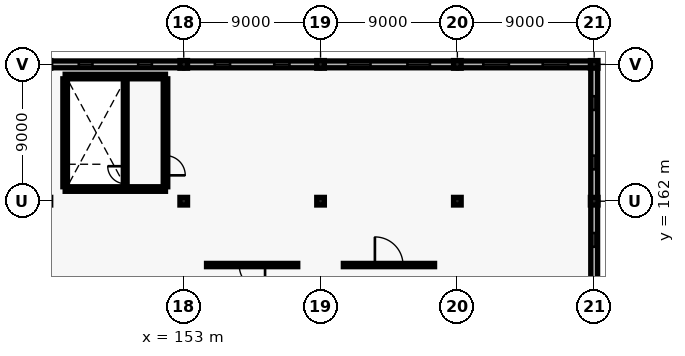
"""IFC4 building model, lengths in metres.
Left out: names, types, materials, properties, quantities, classifications, styles, units other than length and angle.
Written with IfcOpenShell. Run it as: python <this file> out.ifc"""

import sys

from ifc_helpers import new_model, si_unit, direction, frame, frame_2d, origin, origin_2d, place, context, subcontext, project, spatial, rectangle, extrude, element, fill, save


model = new_model("IFC4")
c1 = context("Model", 3, precision=1e-05, world=origin(), true_north=direction((0.0, 1.0)))
c2 = subcontext(c1, "Body", "Model", "MODEL_VIEW")
j1 = project(units=[si_unit("LENGTHUNIT", "METRE"), si_unit("PLANEANGLEUNIT", "RADIAN")], contexts=[c1])
p1 = place(None, origin())
s1 = spatial("IfcSite", under=j1, at=p1, CompositionType="ELEMENT")
p2 = place(p1, origin())
s2 = spatial("IfcBuilding", under=s1, at=p2, CompositionType="ELEMENT")
p3 = place(p2, frame((0.0, 0.0, 9.6)))
s3 = spatial("IfcBuildingStorey", under=s2, at=p3, CompositionType="ELEMENT", Elevation=9.6)
for number, where, z_axis, x_axis in (
    (1, (153.0, 162.0, 0.0), (0.0, 0.0, 1.0), (1.0, 0.0, 0.0)),
    (2, (153.0, 171.0, 0.0), (0.0, 0.0, 1.0), (1.0, 0.0, 0.0)),
    (3, (162.0, 162.0, 0.0), (0.0, 0.0, 1.0), (1.0, 0.0, 0.0)),
    (4, (162.0, 171.0, 0.0), (0.0, 0.0, 1.0), (1.0, 0.0, 0.0)),
    (5, (171.0, 162.0, 0.0), (0.0, 0.0, 1.0), (1.0, 0.0, 0.0)),
    (6, (171.0, 171.0, 0.0), (0.0, 0.0, 1.0), (1.0, 0.0, 0.0)),
    (7, (180.0, 162.0, 0.0), (0.0, 0.0, 1.0), (1.0, 0.0, 0.0)),
    (8, (180.0, 171.0, 0.0), (0.0, 0.0, 1.0), (1.0, 0.0, 0.0)),
):
    element("IfcColumn", number, at=place(p3, frame(where, z_axis=z_axis, x_axis=x_axis)), inside=s3, PredefinedType="COLUMN", context=c2, shape_type="SweptSolid", body=[
        extrude(rectangle(XDim=0.5, YDim=0.5, at=origin_2d()), origin(), (0.0, 0.0, 1.0), 3.9),
    ])
p4 = place(p3, frame((144.06, 171.0, 0.0), z_axis=(0.0, 0.0, 1.0), x_axis=(1.0, 0.0, 0.0)))
e9 = element("IfcWall", 9, at=p4, inside=s3, PredefinedType="SOLIDWALL", context=c2, shape_type="SweptSolid", body=[
    extrude(rectangle(XDim=8.88, YDim=0.45, at=frame_2d((4.44, 0.0))), origin(), (0.0, 0.0, 1.0), 3.15),
])
p5 = place(p4, frame((2.036, 0.0, 0.9)))
e10 = element("IfcOpeningElement", 10, at=p5, cuts=e9, PredefinedType="OPENING", context=c2, shape_type="SweptSolid", body=[
    extrude(rectangle(XDim=0.9, YDim=1.2, at=frame_2d((0.45, 0.6))), frame((0.0, 0.235, 0.0), z_axis=(0.0, -1.0, 0.0), x_axis=(1.0, 0.0, 0.0)), (0.0, 0.0, 1.0), 0.47),
])
p6 = place(p4, frame((5.944, 0.0, 0.9)))
e11 = element("IfcOpeningElement", 11, at=p6, cuts=e9, PredefinedType="OPENING", context=c2, shape_type="SweptSolid", body=[
    extrude(rectangle(XDim=0.9, YDim=1.2, at=frame_2d((0.45, 0.6))), frame((0.0, 0.235, 0.0), z_axis=(0.0, -1.0, 0.0), x_axis=(1.0, 0.0, 0.0)), (0.0, 0.0, 1.0), 0.47),
])
p7 = place(p3, frame((153.06, 171.0, 0.0), z_axis=(0.0, 0.0, 1.0), x_axis=(1.0, 0.0, 0.0)))
e12 = element("IfcWall", 12, at=p7, inside=s3, PredefinedType="SOLIDWALL", context=c2, shape_type="SweptSolid", body=[
    extrude(rectangle(XDim=8.88, YDim=0.45, at=frame_2d((4.44, 0.0))), origin(), (0.0, 0.0, 1.0), 3.15),
])
p8 = place(p7, frame((1.986, 0.0, 0.9)))
e13 = element("IfcOpeningElement", 13, at=p8, cuts=e12, PredefinedType="OPENING", context=c2, shape_type="SweptSolid", body=[
    extrude(rectangle(XDim=1.0, YDim=1.5, at=frame_2d((0.5, 0.75))), frame((0.0, 0.235, 0.0), z_axis=(0.0, -1.0, 0.0), x_axis=(1.0, 0.0, 0.0)), (0.0, 0.0, 1.0), 0.47),
])
p9 = place(p7, frame((5.894, 0.0, 0.9)))
e14 = element("IfcOpeningElement", 14, at=p9, cuts=e12, PredefinedType="OPENING", context=c2, shape_type="SweptSolid", body=[
    extrude(rectangle(XDim=1.0, YDim=1.5, at=frame_2d((0.5, 0.75))), frame((0.0, 0.235, 0.0), z_axis=(0.0, -1.0, 0.0), x_axis=(1.0, 0.0, 0.0)), (0.0, 0.0, 1.0), 0.47),
])
p10 = place(p3, frame((162.06, 171.0, 0.0), z_axis=(0.0, 0.0, 1.0), x_axis=(1.0, 0.0, 0.0)))
e15 = element("IfcWall", 15, at=p10, inside=s3, PredefinedType="SOLIDWALL", context=c2, shape_type="SweptSolid", body=[
    extrude(rectangle(XDim=8.88, YDim=0.45, at=frame_2d((4.44, 0.0))), origin(), (0.0, 0.0, 1.0), 3.15),
])
p11 = place(p10, frame((1.746, 0.0, 0.9)))
e16 = element("IfcOpeningElement", 16, at=p11, cuts=e15, PredefinedType="OPENING", context=c2, shape_type="SweptSolid", body=[
    extrude(rectangle(XDim=1.48, YDim=1.75, at=frame_2d((0.74, 0.875))), frame((0.0, 0.235, 0.0), z_axis=(0.0, -1.0, 0.0), x_axis=(1.0, 0.0, 0.0)), (0.0, 0.0, 1.0), 0.47),
])
p12 = place(p10, frame((5.654, 0.0, 0.9)))
e17 = element("IfcOpeningElement", 17, at=p12, cuts=e15, PredefinedType="OPENING", context=c2, shape_type="SweptSolid", body=[
    extrude(rectangle(XDim=1.48, YDim=1.75, at=frame_2d((0.74, 0.875))), frame((0.0, 0.235, 0.0), z_axis=(0.0, -1.0, 0.0), x_axis=(1.0, 0.0, 0.0)), (0.0, 0.0, 1.0), 0.47),
])
p13 = place(p3, frame((171.06, 171.0, 0.0), z_axis=(0.0, 0.0, 1.0), x_axis=(1.0, 0.0, 0.0)))
e18 = element("IfcWall", 18, at=p13, inside=s3, PredefinedType="SOLIDWALL", context=c2, shape_type="SweptSolid", body=[
    extrude(rectangle(XDim=8.88, YDim=0.45, at=frame_2d((4.44, 0.0))), origin(), (0.0, 0.0, 1.0), 3.15),
])
p14 = place(p13, frame((1.646, 0.0, 0.9)))
e19 = element("IfcOpeningElement", 19, at=p14, cuts=e18, PredefinedType="OPENING", context=c2, shape_type="SweptSolid", body=[
    extrude(rectangle(XDim=1.68, YDim=1.85, at=frame_2d((0.84, 0.925))), frame((0.0, 0.235, 0.0), z_axis=(0.0, -1.0, 0.0), x_axis=(1.0, 0.0, 0.0)), (0.0, 0.0, 1.0), 0.47),
])
p15 = place(p13, frame((5.554, 0.0, 0.9)))
e20 = element("IfcOpeningElement", 20, at=p15, cuts=e18, PredefinedType="OPENING", context=c2, shape_type="SweptSolid", body=[
    extrude(rectangle(XDim=1.68, YDim=1.85, at=frame_2d((0.84, 0.925))), frame((0.0, 0.235, 0.0), z_axis=(0.0, -1.0, 0.0), x_axis=(1.0, 0.0, 0.0)), (0.0, 0.0, 1.0), 0.47),
])
p16 = place(p3, frame((180.0, 153.06, 0.0), z_axis=(0.0, 0.0, 1.0), x_axis=(0.0, 1.0, 0.0)))
e21 = element("IfcWall", 21, at=p16, inside=s3, PredefinedType="SOLIDWALL", context=c2, shape_type="SweptSolid", body=[
    extrude(rectangle(XDim=8.88, YDim=0.45, at=frame_2d((4.44, 0.0))), origin(), (0.0, 0.0, 1.0), 3.15),
])
p17 = place(p16, frame((2.036, 0.0, 0.9)))
e22 = element("IfcOpeningElement", 22, at=p17, cuts=e21, PredefinedType="OPENING", context=c2, shape_type="SweptSolid", body=[
    extrude(rectangle(XDim=0.9, YDim=1.2, at=frame_2d((0.45, 0.6))), frame((0.0, 0.235, 0.0), z_axis=(0.0, -1.0, 0.0), x_axis=(1.0, 0.0, 0.0)), (0.0, 0.0, 1.0), 0.47),
])
p18 = place(p16, frame((5.944, 0.0, 0.9)))
e23 = element("IfcOpeningElement", 23, at=p18, cuts=e21, PredefinedType="OPENING", context=c2, shape_type="SweptSolid", body=[
    extrude(rectangle(XDim=0.9, YDim=1.2, at=frame_2d((0.45, 0.6))), frame((0.0, 0.235, 0.0), z_axis=(0.0, -1.0, 0.0), x_axis=(1.0, 0.0, 0.0)), (0.0, 0.0, 1.0), 0.47),
])
p19 = place(p3, frame((180.0, 162.06, 0.0), z_axis=(0.0, 0.0, 1.0), x_axis=(0.0, 1.0, 0.0)))
e24 = element("IfcWall", 24, at=p19, inside=s3, PredefinedType="SOLIDWALL", context=c2, shape_type="SweptSolid", body=[
    extrude(rectangle(XDim=8.88, YDim=0.45, at=frame_2d((4.44, 0.0))), origin(), (0.0, 0.0, 1.0), 3.15),
])
p20 = place(p19, frame((2.036, 0.0, 0.9)))
e25 = element("IfcOpeningElement", 25, at=p20, cuts=e24, PredefinedType="OPENING", context=c2, shape_type="SweptSolid", body=[
    extrude(rectangle(XDim=0.9, YDim=1.2, at=frame_2d((0.45, 0.6))), frame((0.0, 0.235, 0.0), z_axis=(0.0, -1.0, 0.0), x_axis=(1.0, 0.0, 0.0)), (0.0, 0.0, 1.0), 0.47),
])
p21 = place(p19, frame((5.944, 0.0, 0.9)))
e26 = element("IfcOpeningElement", 26, at=p21, cuts=e24, PredefinedType="OPENING", context=c2, shape_type="SweptSolid", body=[
    extrude(rectangle(XDim=0.9, YDim=1.2, at=frame_2d((0.45, 0.6))), frame((0.0, 0.235, 0.0), z_axis=(0.0, -1.0, 0.0), x_axis=(1.0, 0.0, 0.0)), (0.0, 0.0, 1.0), 0.47),
])
for number, where, z_axis, x_axis in (
    (27, (145.2, 162.8, 0.0), (0.0, 0.0, 1.0), (1.0, 0.0, 0.0)),
    (28, (145.2, 170.2, 0.0), (0.0, 0.0, 1.0), (1.0, 0.0, 0.0)),
):
    element("IfcWall", number, at=place(p3, frame(where, z_axis=z_axis, x_axis=x_axis)), inside=s3, PredefinedType="SHEAR", context=c2, shape_type="SweptSolid", body=[
        extrude(rectangle(XDim=6.6, YDim=0.3, at=frame_2d((3.3, 0.0))), origin(), (0.0, 0.0, 1.0), 3.7),
    ])
p22 = place(p3, frame((145.2, 162.95, 0.0), z_axis=(0.0, 0.0, 1.0), x_axis=(0.0, 1.0, 0.0)))
e29 = element("IfcWall", 29, at=p22, inside=s3, PredefinedType="SHEAR", context=c2, shape_type="SweptSolid", body=[
    extrude(rectangle(XDim=7.1, YDim=0.3, at=frame_2d((3.55, 0.0))), origin(), (0.0, 0.0, 1.0), 3.7),
])
p23 = place(p3, frame((151.8, 162.95, 0.0), z_axis=(0.0, 0.0, 1.0), x_axis=(0.0, 1.0, 0.0)))
e30 = element("IfcWall", 30, at=p23, inside=s3, PredefinedType="SHEAR", context=c2, shape_type="SweptSolid", body=[
    extrude(rectangle(XDim=7.1, YDim=0.3, at=frame_2d((3.55, 0.0))), origin(), (0.0, 0.0, 1.0), 3.7),
])
p24 = place(p23, frame((0.75, 0.0, 0.0)))
e31 = element("IfcOpeningElement", 31, at=p24, cuts=e30, PredefinedType="OPENING", context=c2, shape_type="SweptSolid", body=[
    extrude(rectangle(XDim=1.3, YDim=2.15, at=frame_2d((0.65, 1.075))), frame((0.0, 0.16, 0.0), z_axis=(0.0, -1.0, 0.0), x_axis=(1.0, 0.0, 0.0)), (0.0, 0.0, 1.0), 0.32),
])
p25 = place(p3, frame((149.15, 162.95, 0.0), z_axis=(0.0, 0.0, 1.0), x_axis=(0.0, 1.0, 0.0)))
e32 = element("IfcWall", 32, at=p25, inside=s3, PredefinedType="SHEAR", context=c2, shape_type="SweptSolid", body=[
    extrude(rectangle(XDim=7.1, YDim=0.25, at=frame_2d((3.55, 0.0))), origin(), (0.0, 0.0, 1.0), 3.7),
])
p26 = place(p25, frame((0.2, 0.0, 0.0)))
e33 = element("IfcOpeningElement", 33, at=p26, cuts=e32, PredefinedType="OPENING", context=c2, shape_type="SweptSolid", body=[
    extrude(rectangle(XDim=1.15, YDim=2.15, at=frame_2d((0.575, 1.075))), frame((0.0, 0.135, 0.0), z_axis=(0.0, -1.0, 0.0), x_axis=(1.0, 0.0, 0.0)), (0.0, 0.0, 1.0), 0.27),
])
p27 = place(p3, frame((154.5, 157.8, 0.0), z_axis=(0.0, 0.0, 1.0), x_axis=(1.0, 0.0, 0.0)))
e34 = element("IfcWall", 34, at=p27, inside=s3, PredefinedType="PARTITIONING", context=c2, shape_type="SweptSolid", body=[
    extrude(rectangle(XDim=6.0, YDim=0.215, at=frame_2d((3.0, 0.0))), origin(), (0.0, 0.0, 1.0), 2.9),
])
p28 = place(p27, frame((2.15, 0.0, 0.0)))
e35 = element("IfcOpeningElement", 35, at=p28, cuts=e34, PredefinedType="OPENING", context=c2, shape_type="SweptSolid", body=[
    extrude(rectangle(XDim=1.7, YDim=2.35, at=frame_2d((0.85, 1.175))), frame((0.0, 0.117, 0.0), z_axis=(0.0, -1.0, 0.0), x_axis=(1.0, 0.0, 0.0)), (0.0, 0.0, 1.0), 0.235),
])
p29 = place(p3, frame((163.5, 157.8, 0.0), z_axis=(0.0, 0.0, 1.0), x_axis=(1.0, 0.0, 0.0)))
e36 = element("IfcWall", 36, at=p29, inside=s3, PredefinedType="PARTITIONING", context=c2, shape_type="SweptSolid", body=[
    extrude(rectangle(XDim=6.0, YDim=0.215, at=frame_2d((3.0, 0.0))), origin(), (0.0, 0.0, 1.0), 2.9),
])
p30 = place(p29, frame((2.075, 0.0, 0.0)))
e37 = element("IfcOpeningElement", 37, at=p30, cuts=e36, PredefinedType="OPENING", context=c2, shape_type="SweptSolid", body=[
    extrude(rectangle(XDim=1.85, YDim=2.35, at=frame_2d((0.925, 1.175))), frame((0.0, 0.117, 0.0), z_axis=(0.0, -1.0, 0.0), x_axis=(1.0, 0.0, 0.0)), (0.0, 0.0, 1.0), 0.235),
])
p31 = place(p5, origin())
e38 = element("IfcWindow", 38, at=p31, inside=s3, PartitioningType="SINGLE_PANEL", PredefinedType="WINDOW", context=c2, shape_type="SweptSolid", body=[
    extrude(rectangle(XDim=0.9, YDim=1.2, at=frame_2d((0.45, 0.6))), frame((0.0, 0.03, 0.0), z_axis=(0.0, -1.0, 0.0), x_axis=(1.0, 0.0, 0.0)), (0.0, 0.0, 1.0), 0.06),
])
fill(e10, e38)
p32 = place(p6, origin())
e39 = element("IfcWindow", 39, at=p32, inside=s3, PartitioningType="SINGLE_PANEL", PredefinedType="WINDOW", context=c2, shape_type="SweptSolid", body=[
    extrude(rectangle(XDim=0.9, YDim=1.2, at=frame_2d((0.45, 0.6))), frame((0.0, 0.03, 0.0), z_axis=(0.0, -1.0, 0.0), x_axis=(1.0, 0.0, 0.0)), (0.0, 0.0, 1.0), 0.06),
])
fill(e11, e39)
p33 = place(p8, origin())
e40 = element("IfcWindow", 40, at=p33, inside=s3, PartitioningType="SINGLE_PANEL", PredefinedType="WINDOW", context=c2, shape_type="SweptSolid", body=[
    extrude(rectangle(XDim=1.0, YDim=1.5, at=frame_2d((0.5, 0.75))), frame((0.0, 0.03, 0.0), z_axis=(0.0, -1.0, 0.0), x_axis=(1.0, 0.0, 0.0)), (0.0, 0.0, 1.0), 0.06),
])
fill(e13, e40)
p34 = place(p9, origin())
e41 = element("IfcWindow", 41, at=p34, inside=s3, PartitioningType="SINGLE_PANEL", PredefinedType="WINDOW", context=c2, shape_type="SweptSolid", body=[
    extrude(rectangle(XDim=1.0, YDim=1.5, at=frame_2d((0.5, 0.75))), frame((0.0, 0.03, 0.0), z_axis=(0.0, -1.0, 0.0), x_axis=(1.0, 0.0, 0.0)), (0.0, 0.0, 1.0), 0.06),
])
fill(e14, e41)
p35 = place(p11, origin())
e42 = element("IfcWindow", 42, at=p35, inside=s3, PartitioningType="SINGLE_PANEL", PredefinedType="WINDOW", context=c2, shape_type="SweptSolid", body=[
    extrude(rectangle(XDim=1.48, YDim=1.75, at=frame_2d((0.74, 0.875))), frame((0.0, 0.03, 0.0), z_axis=(0.0, -1.0, 0.0), x_axis=(1.0, 0.0, 0.0)), (0.0, 0.0, 1.0), 0.06),
])
fill(e16, e42)
p36 = place(p12, origin())
e43 = element("IfcWindow", 43, at=p36, inside=s3, PartitioningType="SINGLE_PANEL", PredefinedType="WINDOW", context=c2, shape_type="SweptSolid", body=[
    extrude(rectangle(XDim=1.48, YDim=1.75, at=frame_2d((0.74, 0.875))), frame((0.0, 0.03, 0.0), z_axis=(0.0, -1.0, 0.0), x_axis=(1.0, 0.0, 0.0)), (0.0, 0.0, 1.0), 0.06),
])
fill(e17, e43)
p37 = place(p14, origin())
e44 = element("IfcWindow", 44, at=p37, inside=s3, PartitioningType="SINGLE_PANEL", PredefinedType="WINDOW", context=c2, shape_type="SweptSolid", body=[
    extrude(rectangle(XDim=1.68, YDim=1.85, at=frame_2d((0.84, 0.925))), frame((0.0, 0.03, 0.0), z_axis=(0.0, -1.0, 0.0), x_axis=(1.0, 0.0, 0.0)), (0.0, 0.0, 1.0), 0.06),
])
fill(e19, e44)
p38 = place(p15, origin())
e45 = element("IfcWindow", 45, at=p38, inside=s3, PartitioningType="SINGLE_PANEL", PredefinedType="WINDOW", context=c2, shape_type="SweptSolid", body=[
    extrude(rectangle(XDim=1.68, YDim=1.85, at=frame_2d((0.84, 0.925))), frame((0.0, 0.03, 0.0), z_axis=(0.0, -1.0, 0.0), x_axis=(1.0, 0.0, 0.0)), (0.0, 0.0, 1.0), 0.06),
])
fill(e20, e45)
p39 = place(p18, origin())
e46 = element("IfcWindow", 46, at=p39, inside=s3, PartitioningType="SINGLE_PANEL", PredefinedType="WINDOW", context=c2, shape_type="SweptSolid", body=[
    extrude(rectangle(XDim=0.9, YDim=1.2, at=frame_2d((0.45, 0.6))), frame((0.0, 0.03, 0.0), z_axis=(0.0, -1.0, 0.0), x_axis=(1.0, 0.0, 0.0)), (0.0, 0.0, 1.0), 0.06),
])
fill(e23, e46)
p40 = place(p20, origin())
e47 = element("IfcWindow", 47, at=p40, inside=s3, PartitioningType="SINGLE_PANEL", PredefinedType="WINDOW", context=c2, shape_type="SweptSolid", body=[
    extrude(rectangle(XDim=0.9, YDim=1.2, at=frame_2d((0.45, 0.6))), frame((0.0, 0.03, 0.0), z_axis=(0.0, -1.0, 0.0), x_axis=(1.0, 0.0, 0.0)), (0.0, 0.0, 1.0), 0.06),
])
fill(e25, e47)
p41 = place(p21, origin())
e48 = element("IfcWindow", 48, at=p41, inside=s3, PartitioningType="SINGLE_PANEL", PredefinedType="WINDOW", context=c2, shape_type="SweptSolid", body=[
    extrude(rectangle(XDim=0.9, YDim=1.2, at=frame_2d((0.45, 0.6))), frame((0.0, 0.03, 0.0), z_axis=(0.0, -1.0, 0.0), x_axis=(1.0, 0.0, 0.0)), (0.0, 0.0, 1.0), 0.06),
])
fill(e26, e48)
p42 = place(p24, frame((1.3, 0.0, 0.0), z_axis=(0.0, 0.0, 1.0), x_axis=(-1.0, 0.0, 0.0)))
e49 = element("IfcDoor", 49, at=p42, inside=s3, OperationType="DOUBLE_DOOR_SINGLE_SWING", PredefinedType="DOOR", context=c2, shape_type="SweptSolid", body=[
    extrude(rectangle(XDim=1.3, YDim=2.15, at=frame_2d((0.65, 1.075))), frame((0.0, 0.025, 0.0), z_axis=(0.0, -1.0, 0.0), x_axis=(1.0, 0.0, 0.0)), (0.0, 0.0, 1.0), 0.05),
])
fill(e31, e49)
p43 = place(p26, frame((1.15, 0.0, 0.0), z_axis=(0.0, 0.0, 1.0), x_axis=(-1.0, 0.0, 0.0)))
e50 = element("IfcDoor", 50, at=p43, inside=s3, OperationType="SINGLE_SWING_RIGHT", PredefinedType="DOOR", context=c2, shape_type="SweptSolid", body=[
    extrude(rectangle(XDim=1.15, YDim=2.15, at=frame_2d((0.575, 1.075))), frame((0.0, 0.025, 0.0), z_axis=(0.0, -1.0, 0.0), x_axis=(1.0, 0.0, 0.0)), (0.0, 0.0, 1.0), 0.05),
])
fill(e33, e50)
p44 = place(p28, origin())
e51 = element("IfcDoor", 51, at=p44, inside=s3, OperationType="SINGLE_SWING_RIGHT", PredefinedType="DOOR", context=c2, shape_type="SweptSolid", body=[
    extrude(rectangle(XDim=1.7, YDim=2.35, at=frame_2d((0.85, 1.175))), frame((0.0, 0.025, 0.0), z_axis=(0.0, -1.0, 0.0), x_axis=(1.0, 0.0, 0.0)), (0.0, 0.0, 1.0), 0.05),
])
fill(e35, e51)
p45 = place(p30, origin())
e52 = element("IfcDoor", 52, at=p45, inside=s3, OperationType="SINGLE_SWING_LEFT", PredefinedType="DOOR", context=c2, shape_type="SweptSolid", body=[
    extrude(rectangle(XDim=1.85, YDim=2.35, at=frame_2d((0.925, 1.175))), frame((0.0, 0.025, 0.0), z_axis=(0.0, -1.0, 0.0), x_axis=(1.0, 0.0, 0.0)), (0.0, 0.0, 1.0), 0.05),
])
fill(e37, e52)
save(model, sys.argv[1])
